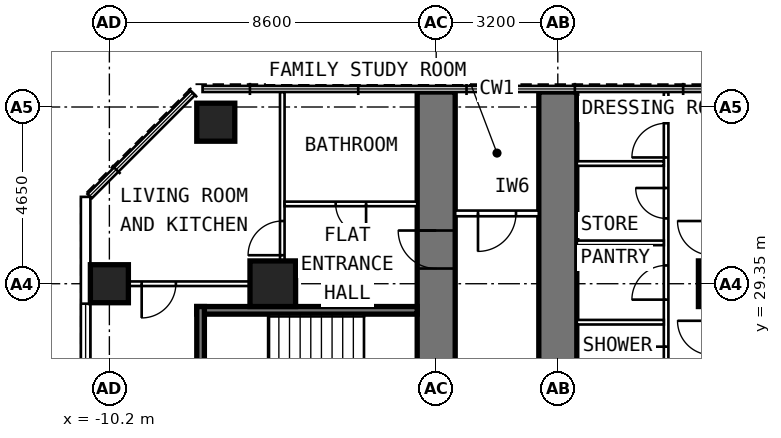
"""IFC4 building model, lengths in metres.
Left out: names, types, materials, properties, quantities, classifications, styles, units other than length and angle.
Written with IfcOpenShell. Run it as: python <this file> out.ifc"""

import sys

from ifc_helpers import new_model, si_unit, direction, frame, frame_2d, origin, origin_2d, place, context, subcontext, project, spatial, rectangle, extrude, element, fill, save


model = new_model("IFC4")
c1 = context("Model", 3, precision=1e-05, world=origin(), true_north=direction((0.0, 1.0)))
c2 = subcontext(c1, "Body", "Model", "MODEL_VIEW")
j1 = project(units=[si_unit("LENGTHUNIT", "METRE"), si_unit("PLANEANGLEUNIT", "RADIAN")], contexts=[c1])
p1 = place(None, origin())
s1 = spatial("IfcSite", under=j1, at=p1, CompositionType="ELEMENT")
p2 = place(p1, origin())
s2 = spatial("IfcBuilding", under=s1, at=p2, CompositionType="ELEMENT")
p3 = place(p2, frame((0.0, 0.0, 57.4)))
s3 = spatial("IfcBuildingStorey", under=s2, at=p3, CompositionType="ELEMENT", Elevation=57.4)
for number, where, z_axis, x_axis in (
    (1, (-10.2, 29.35, 0.0), (0.0, 0.0, 1.0), (0.0, 1.0, 0.0)),
    (2, (-7.4, 33.6, 0.0), (0.0, 0.0, 1.0), (0.0, 1.0, 0.0)),
):
    element("IfcColumn", number, at=place(p3, frame(where, z_axis=z_axis, x_axis=x_axis)), inside=s3, PredefinedType="COLUMN", context=c2, shape_type="SweptSolid", body=[
        extrude(rectangle(XDim=1.0, YDim=1.0, at=origin_2d()), origin(), (0.0, 0.0, 1.0), 3.6),
    ])
for number, where, z_axis, x_axis in (
    (3, (-5.9, 29.35, 0.0), (0.0, 0.0, 1.0), (0.0, 1.0, 0.0)),
    (4, (5.9, 29.35, 0.0), (0.0, 0.0, 1.0), (0.0, 1.0, 0.0)),
):
    element("IfcColumn", number, at=place(p3, frame(where, z_axis=z_axis, x_axis=x_axis)), inside=s3, PredefinedType="COLUMN", context=c2, shape_type="SweptSolid", body=[
        extrude(rectangle(XDim=1.2, YDim=1.2, at=origin_2d()), origin(), (0.0, 0.0, 1.0), 3.6),
    ])
p4 = place(p3, frame((-1.6, 23.65, 0.0), z_axis=(0.0, 0.0, 1.0), x_axis=(0.0, 1.0, 0.0)))
e5 = element("IfcWall", 5, at=p4, inside=s3, PredefinedType="SHEAR", context=c2, shape_type="SweptSolid", body=[
    extrude(rectangle(XDim=10.745, YDim=1.0, at=frame_2d((5.373, 0.0))), origin(), (0.0, 0.0, 1.0), 3.6),
])
p5 = place(p4, frame((6.1, 0.0, 0.0)))
e6 = element("IfcOpeningElement", 6, at=p5, cuts=e5, PredefinedType="OPENING", context=c2, shape_type="SweptSolid", body=[
    extrude(rectangle(XDim=1.0, YDim=2.1, at=frame_2d((0.5, 1.05))), frame((0.0, 0.512, 0.0), z_axis=(0.0, -1.0, 0.0), x_axis=(1.0, 0.0, 0.0)), (0.0, 0.0, 1.0), 1.024),
])
p6 = place(p4, frame((1.35, 0.0, 0.0)))
e7 = element("IfcOpeningElement", 7, at=p6, cuts=e5, PredefinedType="OPENING", context=c2, shape_type="SweptSolid", body=[
    extrude(rectangle(XDim=1.0, YDim=2.1, at=frame_2d((0.5, 1.05))), frame((0.0, 0.512, 0.0), z_axis=(0.0, -1.0, 0.0), x_axis=(1.0, 0.0, 0.0)), (0.0, 0.0, 1.0), 1.024),
])
p7 = place(p3, frame((1.6, 23.65, 0.0), z_axis=(0.0, 0.0, 1.0), x_axis=(0.0, 1.0, 0.0)))
e8 = element("IfcWall", 8, at=p7, inside=s3, PredefinedType="SHEAR", context=c2, shape_type="SweptSolid", body=[
    extrude(rectangle(XDim=10.745, YDim=1.0, at=frame_2d((5.373, 0.0))), origin(), (0.0, 0.0, 1.0), 3.6),
])
p8 = place(p7, frame((0.9, 0.0, 0.0)))
e9 = element("IfcOpeningElement", 9, at=p8, cuts=e8, PredefinedType="OPENING", context=c2, shape_type="SweptSolid", body=[
    extrude(rectangle(XDim=1.0, YDim=2.1, at=frame_2d((0.5, 1.05))), frame((0.0, 0.512, 0.0), z_axis=(0.0, -1.0, 0.0), x_axis=(1.0, 0.0, 0.0)), (0.0, 0.0, 1.0), 1.024),
])
p9 = place(p3, frame((-10.825, 6.148, 0.0), z_axis=(0.0, 0.0, 1.0), x_axis=(0.0, 1.0, 0.0)))
e10 = element("IfcWall", 10, at=p9, inside=s3, PredefinedType="SOLIDWALL", context=c2, shape_type="SweptSolid", body=[
    extrude(rectangle(XDim=25.487, YDim=0.25, at=frame_2d((12.744, 0.0))), origin(), (0.0, 0.0, 1.0), 3.35),
])
p10 = place(p9, frame((0.927, 0.0, 0.8)))
e11 = element("IfcOpeningElement", 11, at=p10, cuts=e10, PredefinedType="OPENING", context=c2, shape_type="SweptSolid", body=[
    extrude(rectangle(XDim=1.8, YDim=1.8, at=frame_2d((0.9, 0.9))), frame((0.0, 0.137, 0.0), z_axis=(0.0, -1.0, 0.0), x_axis=(1.0, 0.0, 0.0)), (0.0, 0.0, 1.0), 0.274),
])
p11 = place(p9, frame((3.777, 0.0, 0.8)))
e12 = element("IfcOpeningElement", 12, at=p11, cuts=e10, PredefinedType="OPENING", context=c2, shape_type="SweptSolid", body=[
    extrude(rectangle(XDim=1.8, YDim=1.8, at=frame_2d((0.9, 0.9))), frame((0.0, 0.137, 0.0), z_axis=(0.0, -1.0, 0.0), x_axis=(1.0, 0.0, 0.0)), (0.0, 0.0, 1.0), 0.274),
])
p12 = place(p9, frame((6.627, 0.0, 0.8)))
e13 = element("IfcOpeningElement", 13, at=p12, cuts=e10, PredefinedType="OPENING", context=c2, shape_type="SweptSolid", body=[
    extrude(rectangle(XDim=1.8, YDim=1.8, at=frame_2d((0.9, 0.9))), frame((0.0, 0.137, 0.0), z_axis=(0.0, -1.0, 0.0), x_axis=(1.0, 0.0, 0.0)), (0.0, 0.0, 1.0), 0.274),
])
p13 = place(p9, frame((9.477, 0.0, 0.8)))
e14 = element("IfcOpeningElement", 14, at=p13, cuts=e10, PredefinedType="OPENING", context=c2, shape_type="SweptSolid", body=[
    extrude(rectangle(XDim=1.8, YDim=1.8, at=frame_2d((0.9, 0.9))), frame((0.0, 0.137, 0.0), z_axis=(0.0, -1.0, 0.0), x_axis=(1.0, 0.0, 0.0)), (0.0, 0.0, 1.0), 0.274),
])
p14 = place(p9, frame((12.327, 0.0, 0.8)))
e15 = element("IfcOpeningElement", 15, at=p14, cuts=e10, PredefinedType="OPENING", context=c2, shape_type="SweptSolid", body=[
    extrude(rectangle(XDim=1.8, YDim=1.8, at=frame_2d((0.9, 0.9))), frame((0.0, 0.137, 0.0), z_axis=(0.0, -1.0, 0.0), x_axis=(1.0, 0.0, 0.0)), (0.0, 0.0, 1.0), 0.274),
])
p15 = place(p9, frame((15.177, 0.0, 0.8)))
e16 = element("IfcOpeningElement", 16, at=p15, cuts=e10, PredefinedType="OPENING", context=c2, shape_type="SweptSolid", body=[
    extrude(rectangle(XDim=1.8, YDim=1.8, at=frame_2d((0.9, 0.9))), frame((0.0, 0.137, 0.0), z_axis=(0.0, -1.0, 0.0), x_axis=(1.0, 0.0, 0.0)), (0.0, 0.0, 1.0), 0.274),
])
p16 = place(p9, frame((18.027, 0.0, 0.8)))
e17 = element("IfcOpeningElement", 17, at=p16, cuts=e10, PredefinedType="OPENING", context=c2, shape_type="SweptSolid", body=[
    extrude(rectangle(XDim=1.8, YDim=1.8, at=frame_2d((0.9, 0.9))), frame((0.0, 0.137, 0.0), z_axis=(0.0, -1.0, 0.0), x_axis=(1.0, 0.0, 0.0)), (0.0, 0.0, 1.0), 0.274),
])
p17 = place(p9, frame((20.877, 0.0, 0.8)))
e18 = element("IfcOpeningElement", 18, at=p17, cuts=e10, PredefinedType="OPENING", context=c2, shape_type="SweptSolid", body=[
    extrude(rectangle(XDim=1.8, YDim=1.8, at=frame_2d((0.9, 0.9))), frame((0.0, 0.137, 0.0), z_axis=(0.0, -1.0, 0.0), x_axis=(1.0, 0.0, 0.0)), (0.0, 0.0, 1.0), 0.274),
])
p18 = place(p3, frame((-5.71, 29.35, 0.0), z_axis=(0.0, 0.0, 1.0), x_axis=(-1.0, 0.0, 0.0)))
e19 = element("IfcWall", 19, at=p18, inside=s3, PredefinedType="PARTITIONING", context=c2, shape_type="SweptSolid", body=[
    extrude(rectangle(XDim=4.99, YDim=0.12, at=frame_2d((2.495, 0.0))), origin(), (0.0, 0.0, 1.0), 2.45),
])
p19 = place(p18, frame((2.74, 0.0, 0.0)))
e20 = element("IfcOpeningElement", 20, at=p19, cuts=e19, PredefinedType="OPENING", context=c2, shape_type="SweptSolid", body=[
    extrude(rectangle(XDim=0.9, YDim=2.1, at=frame_2d((0.45, 1.05))), frame((0.0, 0.072, 0.0), z_axis=(0.0, -1.0, 0.0), x_axis=(1.0, 0.0, 0.0)), (0.0, 0.0, 1.0), 0.144),
])
p20 = place(p3, frame((-5.65, 28.95, 0.0), z_axis=(0.0, 0.0, 1.0), x_axis=(0.0, 1.0, 0.0)))
e21 = element("IfcWall", 21, at=p20, inside=s3, PredefinedType="PARTITIONING", context=c2, shape_type="SweptSolid", body=[
    extrude(rectangle(XDim=5.445, YDim=0.12, at=frame_2d((2.723, 0.0))), origin(), (0.0, 0.0, 1.0), 3.35),
])
p21 = place(p20, frame((1.15, 0.0, 0.0)))
e22 = element("IfcOpeningElement", 22, at=p21, cuts=e21, PredefinedType="OPENING", context=c2, shape_type="SweptSolid", body=[
    extrude(rectangle(XDim=0.9, YDim=2.1, at=frame_2d((0.45, 1.05))), frame((0.0, 0.072, 0.0), z_axis=(0.0, -1.0, 0.0), x_axis=(1.0, 0.0, 0.0)), (0.0, 0.0, 1.0), 0.144),
])
p22 = place(p3, frame((-2.1, 31.45, 0.0), z_axis=(0.0, 0.0, 1.0), x_axis=(-1.0, 0.0, 0.0)))
e23 = element("IfcWall", 23, at=p22, inside=s3, PredefinedType="PARTITIONING", context=c2, shape_type="SweptSolid", body=[
    extrude(rectangle(XDim=3.49, YDim=0.12, at=frame_2d((1.745, 0.0))), origin(), (0.0, 0.0, 1.0), 3.35),
])
p23 = place(p22, frame((1.345, 0.0, 0.0)))
e24 = element("IfcOpeningElement", 24, at=p23, cuts=e23, PredefinedType="OPENING", context=c2, shape_type="SweptSolid", body=[
    extrude(rectangle(XDim=0.8, YDim=2.1, at=frame_2d((0.4, 1.05))), frame((0.0, 0.072, 0.0), z_axis=(0.0, -1.0, 0.0), x_axis=(1.0, 0.0, 0.0)), (0.0, 0.0, 1.0), 0.144),
])
p24 = place(p3, frame((4.45, 15.2, 0.0), z_axis=(0.0, 0.0, 1.0), x_axis=(0.0, 1.0, 0.0)))
e25 = element("IfcWall", 25, at=p24, inside=s3, PredefinedType="PARTITIONING", context=c2, shape_type="SweptSolid", body=[
    extrude(rectangle(XDim=19.195, YDim=0.12, at=frame_2d((9.598, 0.0))), origin(), (0.0, 0.0, 1.0), 3.35),
])
p25 = place(p24, frame((1.329, 0.0, 0.0)))
e26 = element("IfcOpeningElement", 26, at=p25, cuts=e25, PredefinedType="OPENING", context=c2, shape_type="SweptSolid", body=[
    extrude(rectangle(XDim=0.9, YDim=2.1, at=frame_2d((0.45, 1.05))), frame((0.0, 0.072, 0.0), z_axis=(0.0, -1.0, 0.0), x_axis=(1.0, 0.0, 0.0)), (0.0, 0.0, 1.0), 0.144),
])
p26 = place(p24, frame((3.336, 0.0, 0.0)))
e27 = element("IfcOpeningElement", 27, at=p26, cuts=e25, PredefinedType="OPENING", context=c2, shape_type="SweptSolid", body=[
    extrude(rectangle(XDim=0.8, YDim=2.1, at=frame_2d((0.4, 1.05))), frame((0.0, 0.072, 0.0), z_axis=(0.0, -1.0, 0.0), x_axis=(1.0, 0.0, 0.0)), (0.0, 0.0, 1.0), 0.144),
])
p27 = place(p24, frame((6.532, 0.0, 0.0)))
e28 = element("IfcOpeningElement", 28, at=p27, cuts=e25, PredefinedType="OPENING", context=c2, shape_type="SweptSolid", body=[
    extrude(rectangle(XDim=0.8, YDim=2.1, at=frame_2d((0.4, 1.05))), frame((0.0, 0.072, 0.0), z_axis=(0.0, -1.0, 0.0), x_axis=(1.0, 0.0, 0.0)), (0.0, 0.0, 1.0), 0.144),
])
p28 = place(p24, frame((9.5, 0.0, 0.0)))
e29 = element("IfcOpeningElement", 29, at=p28, cuts=e25, PredefinedType="OPENING", context=c2, shape_type="SweptSolid", body=[
    extrude(rectangle(XDim=0.9, YDim=2.1, at=frame_2d((0.45, 1.05))), frame((0.0, 0.072, 0.0), z_axis=(0.0, -1.0, 0.0), x_axis=(1.0, 0.0, 0.0)), (0.0, 0.0, 1.0), 0.144),
])
p29 = place(p24, frame((11.694, 0.0, 0.0)))
e30 = element("IfcOpeningElement", 30, at=p29, cuts=e25, PredefinedType="OPENING", context=c2, shape_type="SweptSolid", body=[
    extrude(rectangle(XDim=0.8, YDim=2.1, at=frame_2d((0.4, 1.05))), frame((0.0, 0.072, 0.0), z_axis=(0.0, -1.0, 0.0), x_axis=(1.0, 0.0, 0.0)), (0.0, 0.0, 1.0), 0.144),
])
p30 = place(p24, frame((13.731, 0.0, 0.0)))
e31 = element("IfcOpeningElement", 31, at=p30, cuts=e25, PredefinedType="OPENING", context=c2, shape_type="SweptSolid", body=[
    extrude(rectangle(XDim=0.9, YDim=2.1, at=frame_2d((0.45, 1.05))), frame((0.0, 0.072, 0.0), z_axis=(0.0, -1.0, 0.0), x_axis=(1.0, 0.0, 0.0)), (0.0, 0.0, 1.0), 0.144),
])
p31 = place(p24, frame((15.869, 0.0, 0.0)))
e32 = element("IfcOpeningElement", 32, at=p31, cuts=e25, PredefinedType="OPENING", context=c2, shape_type="SweptSolid", body=[
    extrude(rectangle(XDim=0.8, YDim=2.1, at=frame_2d((0.4, 1.05))), frame((0.0, 0.072, 0.0), z_axis=(0.0, -1.0, 0.0), x_axis=(1.0, 0.0, 0.0)), (0.0, 0.0, 1.0), 0.144),
])
p32 = place(p24, frame((17.472, 0.0, 0.0)))
e33 = element("IfcOpeningElement", 33, at=p32, cuts=e25, PredefinedType="OPENING", context=c2, shape_type="SweptSolid", body=[
    extrude(rectangle(XDim=0.9, YDim=2.1, at=frame_2d((0.45, 1.05))), frame((0.0, 0.072, 0.0), z_axis=(0.0, -1.0, 0.0), x_axis=(1.0, 0.0, 0.0)), (0.0, 0.0, 1.0), 0.144),
])
for number, where, z_axis, x_axis in (
    (34, (2.1, 28.337, 0.0), (0.0, 0.0, 1.0), (1.0, 0.0, 0.0)),
    (35, (2.1, 30.425, 0.0), (0.0, 0.0, 1.0), (1.0, 0.0, 0.0)),
    (36, (2.1, 32.512, 0.0), (0.0, 0.0, 1.0), (1.0, 0.0, 0.0)),
):
    element("IfcWall", number, at=place(p3, frame(where, z_axis=z_axis, x_axis=x_axis)), inside=s3, PredefinedType="PARTITIONING", context=c2, shape_type="SweptSolid", body=[
        extrude(rectangle(XDim=2.29, YDim=0.12, at=frame_2d((1.145, 0.0))), origin(), (0.0, 0.0, 1.0), 3.35),
    ])
p33 = place(p3, frame((1.1, 31.2, 0.0), z_axis=(0.0, 0.0, 1.0), x_axis=(-1.0, 0.0, 0.0)))
e37 = element("IfcWall", 37, at=p33, inside=s3, PredefinedType="PARTITIONING", context=c2, shape_type="SweptSolid", body=[
    extrude(rectangle(XDim=2.2, YDim=0.15, at=frame_2d((1.1, 0.0))), origin(), (0.0, 0.0, 1.0), 3.35),
])
p34 = place(p33, frame((0.6, 0.0, 0.0)))
e38 = element("IfcOpeningElement", 38, at=p34, cuts=e37, PredefinedType="OPENING", context=c2, shape_type="SweptSolid", body=[
    extrude(rectangle(XDim=1.0, YDim=2.1, at=frame_2d((0.5, 1.05))), frame((0.0, 0.087, 0.0), z_axis=(0.0, -1.0, 0.0), x_axis=(1.0, 0.0, 0.0)), (0.0, 0.0, 1.0), 0.174),
])
p35 = place(p3, frame((-2.1, 28.65, 0.0), z_axis=(0.0, 0.0, 1.0), x_axis=(-1.0, 0.0, 0.0)))
e39 = element("IfcWall", 39, at=p35, inside=s3, PredefinedType="SHEAR", context=c2, shape_type="SweptSolid", body=[
    extrude(rectangle(XDim=5.8, YDim=0.2, at=frame_2d((2.9, 0.0))), origin(), (0.0, 0.0, 1.0), 3.33),
])
p36 = place(p3, frame((-7.8, 24.75, 0.0), z_axis=(0.0, 0.0, 1.0), x_axis=(0.0, 1.0, 0.0)))
e40 = element("IfcWall", 40, at=p36, inside=s3, PredefinedType="SHEAR", context=c2, shape_type="SweptSolid", body=[
    extrude(rectangle(XDim=4.0, YDim=0.2, at=frame_2d((2.0, 0.0))), origin(), (0.0, 0.0, 1.0), 3.33),
])
p37 = place(p17, origin())
e41 = element("IfcWindow", 41, at=p37, inside=s3, PartitioningType="SINGLE_PANEL", PredefinedType="WINDOW", context=c2, shape_type="SweptSolid", body=[
    extrude(rectangle(XDim=1.8, YDim=1.8, at=frame_2d((0.9, 0.9))), frame((0.0, 0.03, 0.0), z_axis=(0.0, -1.0, 0.0), x_axis=(1.0, 0.0, 0.0)), (0.0, 0.0, 1.0), 0.06),
])
fill(e18, e41)
p38 = place(p19, origin())
e42 = element("IfcDoor", 42, at=p38, inside=s3, OperationType="SINGLE_SWING_RIGHT", PredefinedType="DOOR", context=c2, shape_type="SweptSolid", body=[
    extrude(rectangle(XDim=0.9, YDim=2.1, at=frame_2d((0.45, 1.05))), frame((0.0, 0.025, 0.0), z_axis=(0.0, -1.0, 0.0), x_axis=(1.0, 0.0, 0.0)), (0.0, 0.0, 1.0), 0.05),
])
fill(e20, e42)
p39 = place(p21, origin())
e43 = element("IfcDoor", 43, at=p39, inside=s3, OperationType="SINGLE_SWING_LEFT", PredefinedType="DOOR", context=c2, shape_type="SweptSolid", body=[
    extrude(rectangle(XDim=0.9, YDim=2.1, at=frame_2d((0.45, 1.05))), frame((0.0, 0.025, 0.0), z_axis=(0.0, -1.0, 0.0), x_axis=(1.0, 0.0, 0.0)), (0.0, 0.0, 1.0), 0.05),
])
fill(e22, e43)
p40 = place(p23, origin())
e44 = element("IfcDoor", 44, at=p40, inside=s3, OperationType="SINGLE_SWING_LEFT", PredefinedType="DOOR", context=c2, shape_type="SweptSolid", body=[
    extrude(rectangle(XDim=0.8, YDim=2.1, at=frame_2d((0.4, 1.05))), frame((0.0, 0.025, 0.0), z_axis=(0.0, -1.0, 0.0), x_axis=(1.0, 0.0, 0.0)), (0.0, 0.0, 1.0), 0.05),
])
fill(e24, e44)
p41 = place(p5, origin())
e45 = element("IfcDoor", 45, at=p41, inside=s3, OperationType="SINGLE_SWING_RIGHT", PredefinedType="DOOR", context=c2, shape_type="SweptSolid", body=[
    extrude(rectangle(XDim=1.0, YDim=2.1, at=frame_2d((0.5, 1.05))), frame((0.0, 0.25, 0.0), z_axis=(0.0, -1.0, 0.0), x_axis=(1.0, 0.0, 0.0)), (0.0, 0.0, 1.0), 0.5),
])
fill(e6, e45)
p42 = place(p29, origin())
e46 = element("IfcDoor", 46, at=p42, inside=s3, OperationType="SINGLE_SWING_RIGHT", PredefinedType="DOOR", context=c2, shape_type="SweptSolid", body=[
    extrude(rectangle(XDim=0.8, YDim=2.1, at=frame_2d((0.4, 1.05))), frame((0.0, 0.025, 0.0), z_axis=(0.0, -1.0, 0.0), x_axis=(1.0, 0.0, 0.0)), (0.0, 0.0, 1.0), 0.05),
])
fill(e30, e46)
p43 = place(p30, origin())
e47 = element("IfcDoor", 47, at=p43, inside=s3, OperationType="SINGLE_SWING_LEFT", PredefinedType="DOOR", context=c2, shape_type="SweptSolid", body=[
    extrude(rectangle(XDim=0.9, YDim=2.1, at=frame_2d((0.45, 1.05))), frame((0.0, 0.025, 0.0), z_axis=(0.0, -1.0, 0.0), x_axis=(1.0, 0.0, 0.0)), (0.0, 0.0, 1.0), 0.05),
])
fill(e31, e47)
p44 = place(p31, origin())
e48 = element("IfcDoor", 48, at=p44, inside=s3, OperationType="SINGLE_SWING_RIGHT", PredefinedType="DOOR", context=c2, shape_type="SweptSolid", body=[
    extrude(rectangle(XDim=0.8, YDim=2.1, at=frame_2d((0.4, 1.05))), frame((0.0, 0.025, 0.0), z_axis=(0.0, -1.0, 0.0), x_axis=(1.0, 0.0, 0.0)), (0.0, 0.0, 1.0), 0.05),
])
fill(e32, e48)
p45 = place(p32, origin())
e49 = element("IfcDoor", 49, at=p45, inside=s3, OperationType="SINGLE_SWING_LEFT", PredefinedType="DOOR", context=c2, shape_type="SweptSolid", body=[
    extrude(rectangle(XDim=0.9, YDim=2.1, at=frame_2d((0.45, 1.05))), frame((0.0, 0.025, 0.0), z_axis=(0.0, -1.0, 0.0), x_axis=(1.0, 0.0, 0.0)), (0.0, 0.0, 1.0), 0.05),
])
fill(e33, e49)
p46 = place(p34, origin())
e50 = element("IfcDoor", 50, at=p46, inside=s3, OperationType="SINGLE_SWING_RIGHT", PredefinedType="DOOR", context=c2, shape_type="SweptSolid", body=[
    extrude(rectangle(XDim=1.0, YDim=2.1, at=frame_2d((0.5, 1.05))), frame((0.0, 0.025, 0.0), z_axis=(0.0, -1.0, 0.0), x_axis=(1.0, 0.0, 0.0)), (0.0, 0.0, 1.0), 0.05),
])
fill(e38, e50)
save(model, sys.argv[1])
